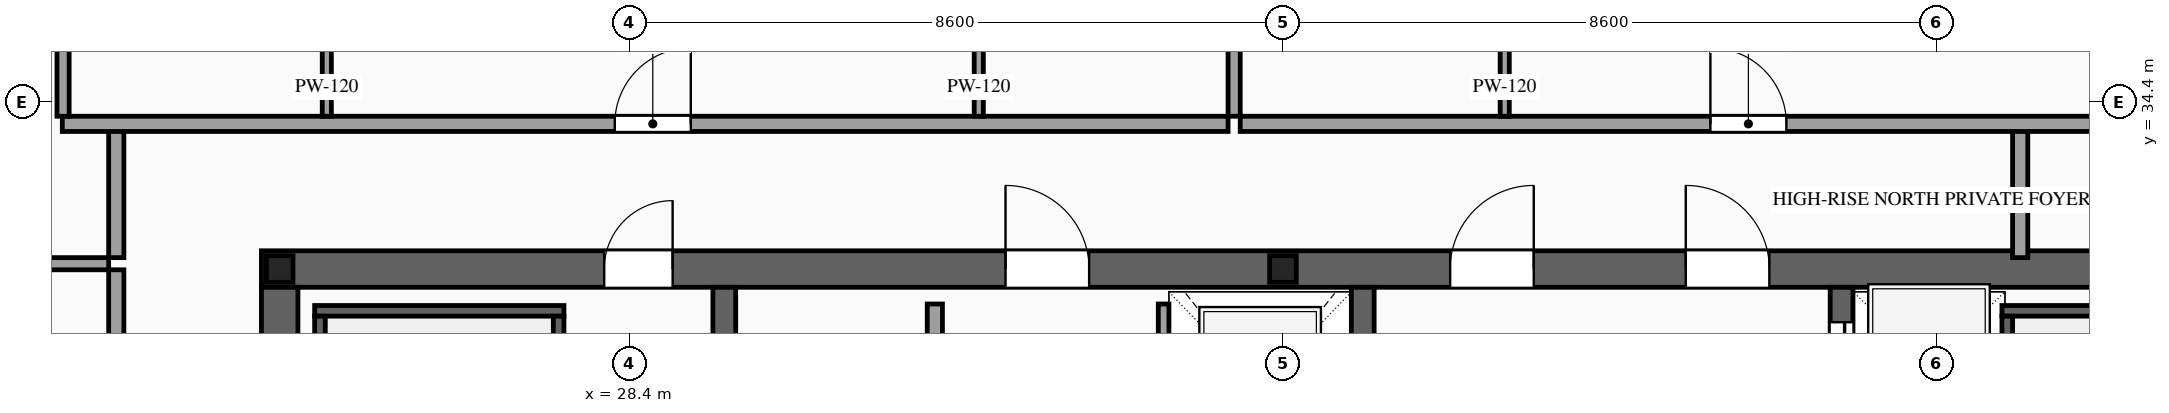
"""IFC4 building model, lengths in metres.
Left out: names, types, materials, properties, quantities, classifications, styles, units other than length and angle.
Written with IfcOpenShell. Run it as: python <this file> out.ifc"""

import sys

from ifc_helpers import new_model, si_unit, direction, frame, frame_2d, origin, origin_2d, place, context, subcontext, project, spatial, rectangle, i_section, extrude, source, transform, mapped, element, fill, save


model = new_model("IFC4")
c1 = context("Model", 3, precision=1e-05, world=origin(), true_north=direction((0.0, 1.0)))
c2 = subcontext(c1, "Body", "Model", "MODEL_VIEW")
j1 = project(units=[si_unit("LENGTHUNIT", "METRE"), si_unit("PLANEANGLEUNIT", "RADIAN")], contexts=[c1])
p1 = place(None, origin())
s1 = spatial("IfcSite", under=j1, at=p1, CompositionType="ELEMENT")
p2 = place(p1, origin())
s2 = spatial("IfcBuilding", under=s1, at=p2, CompositionType="ELEMENT")
p3 = place(p2, frame((0.0, 0.0, 321.7)))
s3 = spatial("IfcBuildingStorey", under=s2, at=p3, CompositionType="ELEMENT", Elevation=321.7)
p4 = place(p3, frame((23.56, 32.2, 0.0), z_axis=(0.0, 0.0, 1.0), x_axis=(1.0, 0.0, 0.0)))
e1 = element("IfcWall", 1, at=p4, inside=s3, PredefinedType="SHEAR", context=c2, shape_type="SweptSolid", body=[
    extrude(rectangle(XDim=26.88, YDim=0.48, at=frame_2d((13.44, 0.0))), origin(), (0.0, 0.0, 1.0), 3.5),
])
p5 = place(p4, frame((4.51, 0.0, 0.0)))
e2 = element("IfcOpeningElement", 2, at=p5, cuts=e1, PredefinedType="OPENING", context=c2, shape_type="SweptSolid", body=[
    extrude(rectangle(XDim=0.9, YDim=2.15, at=frame_2d((0.45, 1.075))), frame((0.0, 0.255, 0.0), z_axis=(0.0, -1.0, 0.0), x_axis=(1.0, 0.0, 0.0)), (0.0, 0.0, 1.0), 0.51),
])
p6 = place(p4, frame((9.79, 0.0, 0.0)))
e3 = element("IfcOpeningElement", 3, at=p6, cuts=e1, PredefinedType="OPENING", context=c2, shape_type="SweptSolid", body=[
    extrude(rectangle(XDim=1.1, YDim=2.2, at=frame_2d((0.55, 1.1))), frame((0.0, 0.255, 0.0), z_axis=(0.0, -1.0, 0.0), x_axis=(1.0, 0.0, 0.0)), (0.0, 0.0, 1.0), 0.51),
])
p7 = place(p4, frame((15.64, 0.0, 0.0)))
e4 = element("IfcOpeningElement", 4, at=p7, cuts=e1, PredefinedType="OPENING", context=c2, shape_type="SweptSolid", body=[
    extrude(rectangle(XDim=1.1, YDim=2.2, at=frame_2d((0.55, 1.1))), frame((0.0, 0.255, 0.0), z_axis=(0.0, -1.0, 0.0), x_axis=(1.0, 0.0, 0.0)), (0.0, 0.0, 1.0), 0.51),
])
p8 = place(p4, frame((18.74, 0.0, 0.0)))
e5 = element("IfcOpeningElement", 5, at=p8, cuts=e1, PredefinedType="OPENING", context=c2, shape_type="SweptSolid", body=[
    extrude(rectangle(XDim=1.1, YDim=2.2, at=frame_2d((0.55, 1.1))), frame((0.0, 0.255, 0.0), z_axis=(0.0, -1.0, 0.0), x_axis=(1.0, 0.0, 0.0)), (0.0, 0.0, 1.0), 0.51),
])
m1 = source(origin(), c2, "Body", "SweptSolid", [
    extrude(rectangle(XDim=12.32, YDim=0.48, at=frame_2d((6.16, 0.0))), origin(), (0.0, 0.0, 1.0), 3.5),
])
p9 = place(p3, frame((23.8, 19.64, 0.0), z_axis=(0.0, 0.0, 1.0), x_axis=(0.0, 1.0, 0.0)))
e6 = element("IfcWall", 6, at=p9, inside=s3, PredefinedType="SHEAR", context=c2, shape_type="MappedRepresentation", body=[
    mapped(m1, transform((0.0, 0.0, 0.0), scale=1.0)),
])
m2 = source(origin(), c2, "Body", "SweptSolid", [
    extrude(rectangle(XDim=12.32, YDim=0.3, at=frame_2d((6.16, 0.0))), origin(), (0.0, 0.0, 1.0), 3.5),
])
for number, where, z_axis, x_axis in (
    (7, (29.65, 19.64, 0.0), (0.0, 0.0, 1.0), (0.0, 1.0, 0.0)),
    (8, (38.05, 19.64, 0.0), (0.0, 0.0, 1.0), (0.0, 1.0, 0.0)),
):
    element("IfcWall", number, at=place(p3, frame(where, z_axis=z_axis, x_axis=x_axis)), inside=s3, PredefinedType="SOLIDWALL", context=c2, shape_type="MappedRepresentation", body=[
        mapped(m2, transform((0.0, 0.0, 0.0), scale=1.0)),
    ])
p10 = place(p3, frame((44.35, 19.64, 0.0), z_axis=(0.0, 0.0, 1.0), x_axis=(0.0, 1.0, 0.0)))
e9 = element("IfcWall", 9, at=p10, inside=s3, PredefinedType="SOLIDWALL", context=c2, shape_type="SweptSolid", body=[
    extrude(rectangle(XDim=12.32, YDim=0.3, at=frame_2d((6.16, 0.0))), origin(), (0.0, 0.0, 1.0), 3.5),
])
p11 = place(p10, frame((6.56, 0.0, 0.0)))
e10 = element("IfcOpeningElement", 10, at=p11, cuts=e9, PredefinedType="OPENING", context=c2, shape_type="SweptSolid", body=[
    extrude(rectangle(XDim=1.1, YDim=2.2, at=frame_2d((0.55, 1.1))), frame((0.0, 0.165, 0.0), z_axis=(0.0, -1.0, 0.0), x_axis=(1.0, 0.0, 0.0)), (0.0, 0.0, 1.0), 0.33),
])
p12 = place(p10, frame((8.66, 0.0, 0.0)))
e11 = element("IfcOpeningElement", 11, at=p12, cuts=e9, PredefinedType="OPENING", context=c2, shape_type="SweptSolid", body=[
    extrude(rectangle(XDim=1.1, YDim=2.2, at=frame_2d((0.55, 1.1))), frame((0.0, 0.165, 0.0), z_axis=(0.0, -1.0, 0.0), x_axis=(1.0, 0.0, 0.0)), (0.0, 0.0, 1.0), 0.33),
])
p13 = place(p10, frame((10.76, 0.0, 0.0)))
e12 = element("IfcOpeningElement", 12, at=p13, cuts=e9, PredefinedType="OPENING", context=c2, shape_type="SweptSolid", body=[
    extrude(rectangle(XDim=1.1, YDim=2.2, at=frame_2d((0.55, 1.1))), frame((0.0, 0.165, 0.0), z_axis=(0.0, -1.0, 0.0), x_axis=(1.0, 0.0, 0.0)), (0.0, 0.0, 1.0), 0.33),
])
m3 = source(origin(), c2, "Body", "SweptSolid", [
    extrude(i_section(OverallWidth=0.35, OverallDepth=0.35, WebThickness=0.012, FlangeThickness=0.019, at=origin_2d()), origin(), (0.0, 0.0, 1.0), 3.5),
])
for number, where, z_axis, x_axis in (
    (13, (23.8, 32.2, 0.0), (0.0, 0.0, 1.0), (1.0, 0.0, 0.0)),
    (14, (37.0, 32.2, 0.0), (0.0, 0.0, 1.0), (1.0, 0.0, 0.0)),
):
    element("IfcColumn", number, at=place(p3, frame(where, z_axis=z_axis, x_axis=x_axis)), inside=s3, PredefinedType="COLUMN", context=c2, shape_type="MappedRepresentation", body=[
        mapped(m3, transform((0.0, 0.0, 0.0), scale=1.0)),
    ])
p14 = place(p3, frame((35.43, 29.4, 0.0), z_axis=(0.0, 0.0, 1.0), x_axis=(0.0, 1.0, 0.0)))
e15 = element("IfcWall", 15, at=p14, inside=s3, PredefinedType="SOLIDWALL", context=c2, shape_type="SweptSolid", body=[
    extrude(rectangle(XDim=2.34, YDim=0.14, at=frame_2d((1.17, 0.0))), origin(), (0.0, 0.0, 1.0), 3.28),
])
p15 = place(p14, frame((0.62, 0.0, 0.0)))
e16 = element("IfcOpeningElement", 16, at=p15, cuts=e15, PredefinedType="OPENING", context=c2, shape_type="SweptSolid", body=[
    extrude(rectangle(XDim=1.1, YDim=2.2, at=frame_2d((0.55, 1.1))), frame((0.0, 0.085, 0.0), z_axis=(0.0, -1.0, 0.0), x_axis=(1.0, 0.0, 0.0)), (0.0, 0.0, 1.0), 0.17),
])
m4 = source(origin(), c2, "Body", "SweptSolid", [
    extrude(rectangle(XDim=3.28, YDim=0.14, at=frame_2d((1.64, 0.0))), origin(), (0.0, 0.0, 1.0), 3.28),
])
p16 = place(p3, frame((24.26, 31.65, 0.0), z_axis=(0.0, 0.0, 1.0), x_axis=(1.0, 0.0, 0.0)))
e17 = element("IfcWall", 17, at=p16, inside=s3, PredefinedType="SOLIDWALL", context=c2, shape_type="MappedRepresentation", body=[
    mapped(m4, transform((0.0, 0.0, 0.0), scale=1.0)),
])
m5 = source(origin(), c2, "Body", "SweptSolid", [
    extrude(rectangle(XDim=8.94, YDim=0.14, at=frame_2d((4.47, 0.0))), origin(), (0.0, 0.0, 1.0), 3.28),
])
for number, where, z_axis, x_axis in (
    (18, (24.33, 22.64, 0.0), (0.0, 0.0, 1.0), (0.0, 1.0, 0.0)),
    (19, (27.47, 22.64, 0.0), (0.0, 0.0, 1.0), (0.0, 1.0, 0.0)),
):
    element("IfcWall", number, at=place(p3, frame(where, z_axis=z_axis, x_axis=x_axis)), inside=s3, PredefinedType="SOLIDWALL", context=c2, shape_type="MappedRepresentation", body=[
        mapped(m5, transform((0.0, 0.0, 0.0), scale=1.0)),
    ])
p17 = place(p3, frame((46.46, 31.65, 0.0), z_axis=(0.0, 0.0, 1.0), x_axis=(1.0, 0.0, 0.0)))
e20 = element("IfcWall", 20, at=p17, inside=s3, PredefinedType="SOLIDWALL", context=c2, shape_type="MappedRepresentation", body=[
    mapped(m4, transform((0.0, 0.0, 0.0), scale=1.0)),
])
p18 = place(p3, frame((46.53, 22.64, 0.0), z_axis=(0.0, 0.0, 1.0), x_axis=(0.0, 1.0, 0.0)))
e21 = element("IfcWall", 21, at=p18, inside=s3, PredefinedType="SOLIDWALL", context=c2, shape_type="MappedRepresentation", body=[
    mapped(m5, transform((0.0, 0.0, 0.0), scale=1.0)),
])
p19 = place(p3, frame((32.42, 19.86, 0.0), z_axis=(0.0, 0.0, 1.0), x_axis=(0.0, 1.0, 0.0)))
e22 = element("IfcWall", 22, at=p19, inside=s3, PredefinedType="PARTITIONING", context=c2, shape_type="SweptSolid", body=[
    extrude(rectangle(XDim=11.88, YDim=0.2, at=frame_2d((5.94, 0.0))), origin(), (0.0, 0.0, 1.0), 3.28),
])
p20 = place(p19, frame((5.49, 0.0, 0.0)))
e23 = element("IfcOpeningElement", 23, at=p20, cuts=e22, PredefinedType="OPENING", context=c2, shape_type="SweptSolid", body=[
    extrude(rectangle(XDim=0.9, YDim=2.15, at=frame_2d((0.45, 1.075))), frame((0.0, 0.115, 0.0), z_axis=(0.0, -1.0, 0.0), x_axis=(1.0, 0.0, 0.0)), (0.0, 0.0, 1.0), 0.23),
])
m6 = source(origin(), c2, "Body", "SweptSolid", [
    extrude(rectangle(XDim=1.7, YDim=0.2, at=frame_2d((0.85, 0.0))), origin(), (0.0, 0.0, 1.0), 3.28),
])
for number, where, z_axis, x_axis in (
    (24, (21.65, 32.35, 0.0), (0.0, 0.0, 1.0), (0.0, 1.0, 0.0)),
    (25, (46.7, 32.35, 0.0), (0.0, 0.0, 1.0), (0.0, 1.0, 0.0)),
):
    element("IfcWall", number, at=place(p3, frame(where, z_axis=z_axis, x_axis=x_axis)), inside=s3, PredefinedType="PARTITIONING", context=c2, shape_type="MappedRepresentation", body=[
        mapped(m6, transform((0.0, 0.0, 0.0), scale=1.0)),
    ])
p21 = place(p3, frame((20.94, 34.11, 0.0), z_axis=(0.0, 0.0, 1.0), x_axis=(1.0, 0.0, 0.0)))
e26 = element("IfcWall", 26, at=p21, inside=s3, PredefinedType="PARTITIONING", context=c2, shape_type="SweptSolid", body=[
    extrude(rectangle(XDim=15.338, YDim=0.2, at=frame_2d((7.669, 0.0))), origin(), (0.0, 0.0, 1.0), 3.28),
])
p22 = place(p21, frame((7.269, 0.0, 0.0)))
e27 = element("IfcOpeningElement", 27, at=p22, cuts=e26, PredefinedType="OPENING", context=c2, shape_type="SweptSolid", body=[
    extrude(rectangle(XDim=1.0, YDim=2.2, at=frame_2d((0.5, 1.1))), frame((0.0, 0.115, 0.0), z_axis=(0.0, -1.0, 0.0), x_axis=(1.0, 0.0, 0.0)), (0.0, 0.0, 1.0), 0.23),
])
m7 = source(origin(), c2, "Body", "SweptSolid", [
    extrude(rectangle(XDim=10.54, YDim=0.16, at=frame_2d((5.27, 0.0))), origin(), (0.0, 0.0, 1.0), 3.28),
])
p23 = place(p3, frame((36.358, 34.21, 0.0), z_axis=(0.0, 0.0, 1.0), x_axis=(0.0, 1.0, 0.0)))
e28 = element("IfcWall", 28, at=p23, inside=s3, PredefinedType="PARTITIONING", context=c2, shape_type="MappedRepresentation", body=[
    mapped(m7, transform((0.0, 0.0, 0.0), scale=1.0)),
])
p24 = place(p3, frame((24.42, 34.21, 0.0), z_axis=(0.0, 0.0, 1.0), x_axis=(0.0, 1.0, 0.0)))
e29 = element("IfcWall", 29, at=p24, inside=s3, PredefinedType="PARTITIONING", context=c2, shape_type="SweptSolid", body=[
    extrude(rectangle(XDim=2.9, YDim=0.12, at=frame_2d((1.45, 0.0))), origin(), (0.0, 0.0, 1.0), 3.28),
])
p25 = place(p24, frame((1.025, 0.0, 0.0)))
e30 = element("IfcOpeningElement", 30, at=p25, cuts=e29, PredefinedType="OPENING", context=c2, shape_type="SweptSolid", body=[
    extrude(rectangle(XDim=0.85, YDim=2.1, at=frame_2d((0.425, 1.05))), frame((0.0, 0.075, 0.0), z_axis=(0.0, -1.0, 0.0), x_axis=(1.0, 0.0, 0.0)), (0.0, 0.0, 1.0), 0.15),
])
p26 = place(p3, frame((32.998, 34.21, 0.0), z_axis=(0.0, 0.0, 1.0), x_axis=(0.0, 1.0, 0.0)))
e31 = element("IfcWall", 31, at=p26, inside=s3, PredefinedType="PARTITIONING", context=c2, shape_type="SweptSolid", body=[
    extrude(rectangle(XDim=2.9, YDim=0.12, at=frame_2d((1.45, 0.0))), origin(), (0.0, 0.0, 1.0), 3.28),
])
p27 = place(p26, frame((1.025, 0.0, 0.0)))
e32 = element("IfcOpeningElement", 32, at=p27, cuts=e31, PredefinedType="OPENING", context=c2, shape_type="SweptSolid", body=[
    extrude(rectangle(XDim=0.85, YDim=2.1, at=frame_2d((0.425, 1.05))), frame((0.0, 0.075, 0.0), z_axis=(0.0, -1.0, 0.0), x_axis=(1.0, 0.0, 0.0)), (0.0, 0.0, 1.0), 0.15),
])
p28 = place(p3, frame((36.438, 34.11, 0.0), z_axis=(0.0, 0.0, 1.0), x_axis=(1.0, 0.0, 0.0)))
e33 = element("IfcWall", 33, at=p28, inside=s3, PredefinedType="PARTITIONING", context=c2, shape_type="SweptSolid", body=[
    extrude(rectangle(XDim=16.622, YDim=0.2, at=frame_2d((8.311, 0.0))), origin(), (0.0, 0.0, 1.0), 3.28),
])
p29 = place(p28, frame((6.186, 0.0, 0.0)))
e34 = element("IfcOpeningElement", 34, at=p29, cuts=e33, PredefinedType="OPENING", context=c2, shape_type="SweptSolid", body=[
    extrude(rectangle(XDim=1.0, YDim=2.2, at=frame_2d((0.5, 1.1))), frame((0.0, 0.115, 0.0), z_axis=(0.0, -1.0, 0.0), x_axis=(1.0, 0.0, 0.0)), (0.0, 0.0, 1.0), 0.23),
])
m8 = source(origin(), c2, "Body", "SweptSolid", [
    extrude(rectangle(XDim=10.39, YDim=0.16, at=frame_2d((5.195, 0.0))), origin(), (0.0, 0.0, 1.0), 3.28),
])
p30 = place(p3, frame((20.95, 34.21, 0.0), z_axis=(0.0, 0.0, 1.0), x_axis=(0.0, 1.0, 0.0)))
e35 = element("IfcWall", 35, at=p30, inside=s3, PredefinedType="PARTITIONING", context=c2, shape_type="MappedRepresentation", body=[
    mapped(m8, transform((0.0, 0.0, 0.0), scale=1.0)),
])
p31 = place(p3, frame((39.918, 34.21, 0.0), z_axis=(0.0, 0.0, 1.0), x_axis=(0.0, 1.0, 0.0)))
e36 = element("IfcWall", 36, at=p31, inside=s3, PredefinedType="PARTITIONING", context=c2, shape_type="SweptSolid", body=[
    extrude(rectangle(XDim=2.9, YDim=0.12, at=frame_2d((1.45, 0.0))), origin(), (0.0, 0.0, 1.0), 3.28),
])
p32 = place(p31, frame((1.025, 0.0, 0.0)))
e37 = element("IfcOpeningElement", 37, at=p32, cuts=e36, PredefinedType="OPENING", context=c2, shape_type="SweptSolid", body=[
    extrude(rectangle(XDim=0.85, YDim=2.1, at=frame_2d((0.425, 1.05))), frame((0.0, 0.075, 0.0), z_axis=(0.0, -1.0, 0.0), x_axis=(1.0, 0.0, 0.0)), (0.0, 0.0, 1.0), 0.15),
])
p33 = place(p3, frame((21.65, 19.41, 0.0), z_axis=(0.0, 0.0, 1.0), x_axis=(0.0, 1.0, 0.0)))
e38 = element("IfcWall", 38, at=p33, inside=s3, PredefinedType="PARTITIONING", context=c2, shape_type="SweptSolid", body=[
    extrude(rectangle(XDim=12.78, YDim=0.2, at=frame_2d((6.39, 0.0))), origin(), (0.0, 0.0, 1.0), 3.28),
])
p34 = place(p33, frame((5.89, 0.0, 0.0)))
e39 = element("IfcOpeningElement", 39, at=p34, cuts=e38, PredefinedType="OPENING", context=c2, shape_type="SweptSolid", body=[
    extrude(rectangle(XDim=1.0, YDim=2.2, at=frame_2d((0.5, 1.1))), frame((0.0, 0.115, 0.0), z_axis=(0.0, -1.0, 0.0), x_axis=(1.0, 0.0, 0.0)), (0.0, 0.0, 1.0), 0.23),
])
m9 = source(origin(), c2, "Body", "SweptSolid", [
    extrude(rectangle(XDim=3.5, YDim=0.16, at=frame_2d((1.75, 0.0))), origin(), (0.0, 0.0, 1.0), 2.825),
])
p35 = place(p3, frame((18.05, 32.27, 0.0), z_axis=(0.0, 0.0, 1.0), x_axis=(1.0, 0.0, 0.0)))
e40 = element("IfcWall", 40, at=p35, inside=s3, PredefinedType="PARTITIONING", context=c2, shape_type="MappedRepresentation", body=[
    mapped(m9, transform((0.0, 0.0, 0.0), scale=1.0)),
])
m10 = source(origin(), c2, "Body", "SweptSolid", [
    extrude(rectangle(XDim=1.1, YDim=2.2, at=frame_2d((0.55, 1.1))), frame((0.0, 0.025, 0.0), z_axis=(0.0, -1.0, 0.0), x_axis=(1.0, 0.0, 0.0)), (0.0, 0.0, 1.0), 0.05),
])
p36 = place(p13, origin())
e41 = element("IfcDoor", 41, at=p36, inside=s3, OperationType="SLIDING_TO_LEFT", PredefinedType="DOOR", context=c2, shape_type="MappedRepresentation", body=[
    mapped(m10, transform((0.0, 0.0, 0.0), scale=1.0)),
])
fill(e12, e41)
m11 = source(origin(), c2, "Body", "SweptSolid", [
    extrude(rectangle(XDim=0.9, YDim=2.15, at=frame_2d((0.45, 1.075))), frame((0.0, 0.025, 0.0), z_axis=(0.0, -1.0, 0.0), x_axis=(1.0, 0.0, 0.0)), (0.0, 0.0, 1.0), 0.05),
])
p37 = place(p5, origin())
e42 = element("IfcDoor", 42, at=p37, inside=s3, OperationType="SINGLE_SWING_RIGHT", PredefinedType="DOOR", context=c2, shape_type="MappedRepresentation", body=[
    mapped(m11, transform((0.0, 0.0, 0.0), scale=1.0)),
])
fill(e2, e42)
m12 = source(origin(), c2, "Body", "SweptSolid", [
    extrude(rectangle(XDim=1.1, YDim=2.2, at=frame_2d((0.55, 1.1))), frame((0.0, 0.025, 0.0), z_axis=(0.0, -1.0, 0.0), x_axis=(1.0, 0.0, 0.0)), (0.0, 0.0, 1.0), 0.05),
])
p38 = place(p6, origin())
e43 = element("IfcDoor", 43, at=p38, inside=s3, OperationType="SINGLE_SWING_LEFT", PredefinedType="DOOR", context=c2, shape_type="MappedRepresentation", body=[
    mapped(m12, transform((0.0, 0.0, 0.0), scale=1.0)),
])
fill(e3, e43)
p39 = place(p7, origin())
e44 = element("IfcDoor", 44, at=p39, inside=s3, OperationType="SINGLE_SWING_RIGHT", PredefinedType="DOOR", context=c2, shape_type="MappedRepresentation", body=[
    mapped(m12, transform((0.0, 0.0, 0.0), scale=1.0)),
])
fill(e4, e44)
p40 = place(p8, origin())
e45 = element("IfcDoor", 45, at=p40, inside=s3, OperationType="SINGLE_SWING_LEFT", PredefinedType="DOOR", context=c2, shape_type="MappedRepresentation", body=[
    mapped(m12, transform((0.0, 0.0, 0.0), scale=1.0)),
])
fill(e5, e45)
m13 = source(origin(), c2, "Body", "SweptSolid", [
    extrude(rectangle(XDim=1.0, YDim=2.2, at=frame_2d((0.5, 1.1))), frame((0.0, 0.025, 0.0), z_axis=(0.0, -1.0, 0.0), x_axis=(1.0, 0.0, 0.0)), (0.0, 0.0, 1.0), 0.05),
])
p41 = place(p22, origin())
e46 = element("IfcDoor", 46, at=p41, inside=s3, OperationType="SINGLE_SWING_RIGHT", PredefinedType="DOOR", context=c2, shape_type="MappedRepresentation", body=[
    mapped(m13, transform((0.0, 0.0, 0.0), scale=1.0)),
])
fill(e27, e46)
p42 = place(p29, origin())
e47 = element("IfcDoor", 47, at=p42, inside=s3, OperationType="SINGLE_SWING_LEFT", PredefinedType="DOOR", context=c2, shape_type="MappedRepresentation", body=[
    mapped(m13, transform((0.0, 0.0, 0.0), scale=1.0)),
])
fill(e34, e47)
save(model, sys.argv[1])
